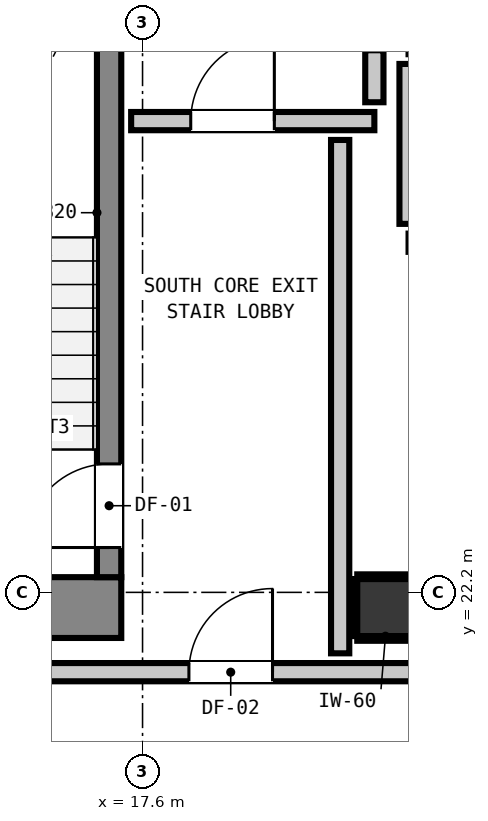
"""IFC4 building model, lengths in metres.
Left out: names, types, materials, properties, quantities, classifications, styles, units other than length and angle.
Written with IfcOpenShell. Run it as: python <this file> out.ifc"""

import sys

from ifc_helpers import new_model, si_unit, direction, frame, frame_2d, origin, origin_2d, place, context, subcontext, project, spatial, rectangle, extrude, element, fill, save


model = new_model("IFC4")
c1 = context("Model", 3, precision=1e-05, world=origin(), true_north=direction((0.0, 1.0)))
c2 = subcontext(c1, "Body", "Model", "MODEL_VIEW")
j1 = project(units=[si_unit("LENGTHUNIT", "METRE"), si_unit("PLANEANGLEUNIT", "RADIAN")], contexts=[c1])
p1 = place(None, origin())
s1 = spatial("IfcSite", under=j1, at=p1, CompositionType="ELEMENT")
p2 = place(p1, origin())
s2 = spatial("IfcBuilding", under=s1, at=p2, CompositionType="ELEMENT")
p3 = place(p2, frame((0.0, 0.0, 200.12)))
s3 = spatial("IfcBuildingStorey", under=s2, at=p3, CompositionType="ELEMENT", Elevation=200.12)
p4 = place(p3, frame((20.8, 22.0, 0.0), z_axis=(0.0, 0.0, 1.0), x_axis=(1.0, 0.0, 0.0)))
e1 = element("IfcColumn", 1, at=p4, inside=s3, PredefinedType="COLUMN", context=c2, shape_type="SweptSolid", body=[
    extrude(rectangle(XDim=0.75, YDim=0.75, at=origin_2d()), origin(), (0.0, 0.0, 1.0), 3.32),
])
p5 = place(p3, frame((13.24, 22.0, 0.0), z_axis=(0.0, 0.0, 1.0), x_axis=(1.0, 0.0, 0.0)))
e2 = element("IfcWall", 2, at=p5, inside=s3, PredefinedType="SHEAR", context=c2, shape_type="SweptSolid", body=[
    extrude(rectangle(XDim=4.08, YDim=0.8, at=frame_2d((2.04, 0.0))), origin(), (0.0, 0.0, 1.0), 3.32),
])
p6 = place(p3, frame((17.16, 22.4, 0.0), z_axis=(0.0, 0.0, 1.0), x_axis=(0.0, 1.0, 0.0)))
e3 = element("IfcWall", 3, at=p6, inside=s3, PredefinedType="SHEAR", context=c2, shape_type="SweptSolid", body=[
    extrude(rectangle(XDim=8.0, YDim=0.32, at=frame_2d((4.0, 0.0))), origin(), (0.0, 0.0, 1.0), 3.32),
])
p7 = place(p6, frame((0.39, 0.0, 0.0)))
e4 = element("IfcOpeningElement", 4, at=p7, cuts=e3, PredefinedType="OPENING", context=c2, shape_type="SweptSolid", body=[
    extrude(rectangle(XDim=1.1, YDim=2.15, at=frame_2d((0.55, 1.075))), frame((0.0, 0.17, 0.0), z_axis=(0.0, -1.0, 0.0), x_axis=(1.0, 0.0, 0.0)), (0.0, 0.0, 1.0), 0.34),
])
for number, where, z_axis, x_axis in (
    (5, (21.1, 26.8, 0.0), (0.0, 0.0, 1.0), (1.0, 0.0, 0.0)),
    (6, (21.1, 29.4, 0.0), (0.0, 0.0, 1.0), (1.0, 0.0, 0.0)),
):
    element("IfcWall", number, at=place(p3, frame(where, z_axis=z_axis, x_axis=x_axis)), inside=s3, PredefinedType="PARTITIONING", context=c2, shape_type="SweptSolid", body=[
        extrude(rectangle(XDim=2.2, YDim=0.24, at=frame_2d((1.1, 0.0))), origin(), (0.0, 0.0, 1.0), 3.1),
    ])
p8 = place(p3, frame((21.1, 27.048, 0.0), z_axis=(0.0, 0.0, 1.0), x_axis=(0.0, 1.0, 0.0)))
e7 = element("IfcWall", 7, at=p8, inside=s3, PredefinedType="PARTITIONING", context=c2, shape_type="SweptSolid", body=[
    extrude(rectangle(XDim=2.104, YDim=0.24, at=frame_2d((1.052, 0.0))), origin(), (0.0, 0.0, 1.0), 2.335),
])
p9 = place(p3, frame((4.587, 21.15, 0.0), z_axis=(0.0, 0.0, 1.0), x_axis=(1.0, 0.0, 0.0)))
e8 = element("IfcWall", 8, at=p9, inside=s3, PredefinedType="PARTITIONING", context=c2, shape_type="SweptSolid", body=[
    extrude(rectangle(XDim=36.626, YDim=0.24, at=frame_2d((18.313, 0.0))), origin(), (0.0, 0.0, 1.0), 3.1),
])
p10 = place(p9, frame((13.623, 0.0, 0.0)))
e9 = element("IfcOpeningElement", 9, at=p10, cuts=e8, PredefinedType="OPENING", context=c2, shape_type="SweptSolid", body=[
    extrude(rectangle(XDim=1.1, YDim=2.15, at=frame_2d((0.55, 1.075))), frame((0.0, 0.13, 0.0), z_axis=(0.0, -1.0, 0.0), x_axis=(1.0, 0.0, 0.0)), (0.0, 0.0, 1.0), 0.26),
])
p11 = place(p9, frame((4.723, 0.0, 0.0)))
e10 = element("IfcOpeningElement", 10, at=p11, cuts=e8, PredefinedType="OPENING", context=c2, shape_type="SweptSolid", body=[
    extrude(rectangle(XDim=1.0, YDim=2.15, at=frame_2d((0.5, 1.075))), frame((0.0, 0.13, 0.0), z_axis=(0.0, -1.0, 0.0), x_axis=(1.0, 0.0, 0.0)), (0.0, 0.0, 1.0), 0.26),
])
p12 = place(p3, frame((17.45, 28.4, 0.0), z_axis=(0.0, 0.0, 1.0), x_axis=(1.0, 0.0, 0.0)))
e11 = element("IfcWall", 11, at=p12, inside=s3, PredefinedType="PARTITIONING", context=c2, shape_type="SweptSolid", body=[
    extrude(rectangle(XDim=3.2, YDim=0.24, at=frame_2d((1.6, 0.0))), origin(), (0.0, 0.0, 1.0), 3.1),
])
p13 = place(p12, frame((0.784, 0.0, 0.0)))
e12 = element("IfcOpeningElement", 12, at=p13, cuts=e11, PredefinedType="OPENING", context=c2, shape_type="SweptSolid", body=[
    extrude(rectangle(XDim=1.1, YDim=2.15, at=frame_2d((0.55, 1.075))), frame((0.0, 0.13, 0.0), z_axis=(0.0, -1.0, 0.0), x_axis=(1.0, 0.0, 0.0)), (0.0, 0.0, 1.0), 0.26),
])
p14 = place(p3, frame((20.2, 21.398, 0.0), z_axis=(0.0, 0.0, 1.0), x_axis=(0.0, 1.0, 0.0)))
e13 = element("IfcWall", 13, at=p14, inside=s3, PredefinedType="PARTITIONING", context=c2, shape_type="SweptSolid", body=[
    extrude(rectangle(XDim=6.754, YDim=0.24, at=frame_2d((3.377, 0.0))), origin(), (0.0, 0.0, 1.0), 3.1),
])
p15 = place(p3, frame((20.65, 28.648, 0.0), z_axis=(0.0, 0.0, 1.0), x_axis=(0.0, 1.0, 0.0)))
e14 = element("IfcWall", 14, at=p15, inside=s3, PredefinedType="PARTITIONING", context=c2, shape_type="SweptSolid", body=[
    extrude(rectangle(XDim=0.684, YDim=0.24, at=frame_2d((0.342, 0.0))), origin(), (0.0, 0.0, 1.0), 2.335),
])
for number, where, z_axis, x_axis in (
    (15, (20.425, 21.593, 0.0), (0.0, 0.0, 1.0), (1.0, 0.0, 0.0)),
    (16, (20.425, 22.407, 0.0), (0.0, 0.0, 1.0), (1.0, 0.0, 0.0)),
):
    element("IfcWall", number, at=place(p3, frame(where, z_axis=z_axis, x_axis=x_axis)), inside=s3, PredefinedType="PARTITIONING", context=c2, shape_type="SweptSolid", body=[
        extrude(rectangle(XDim=0.742, YDim=0.06, at=frame_2d((0.371, 0.0))), origin(), (0.0, 0.0, 1.0), 1.45),
    ])
p16 = place(p3, frame((20.393, 21.625, 0.0), z_axis=(0.0, 0.0, 1.0), x_axis=(0.0, 1.0, 0.0)))
e17 = element("IfcWall", 17, at=p16, inside=s3, PredefinedType="PARTITIONING", context=c2, shape_type="SweptSolid", body=[
    extrude(rectangle(XDim=0.75, YDim=0.06, at=frame_2d((0.375, 0.0))), origin(), (0.0, 0.0, 1.0), 1.45),
])
p17 = place(p7, origin())
e18 = element("IfcDoor", 18, at=p17, inside=s3, OperationType="SINGLE_SWING_LEFT", PredefinedType="DOOR", context=c2, shape_type="SweptSolid", body=[
    extrude(rectangle(XDim=1.1, YDim=2.15, at=frame_2d((0.55, 1.075))), frame((0.0, 0.025, 0.0), z_axis=(0.0, -1.0, 0.0), x_axis=(1.0, 0.0, 0.0)), (0.0, 0.0, 1.0), 0.05),
])
fill(e4, e18)
p18 = place(p13, origin())
e19 = element("IfcDoor", 19, at=p18, inside=s3, OperationType="SINGLE_SWING_RIGHT", PredefinedType="DOOR", context=c2, shape_type="SweptSolid", body=[
    extrude(rectangle(XDim=1.1, YDim=2.15, at=frame_2d((0.55, 1.075))), frame((0.0, 0.025, 0.0), z_axis=(0.0, -1.0, 0.0), x_axis=(1.0, 0.0, 0.0)), (0.0, 0.0, 1.0), 0.05),
])
fill(e12, e19)
p19 = place(p10, origin())
e20 = element("IfcDoor", 20, at=p19, inside=s3, OperationType="SINGLE_SWING_RIGHT", PredefinedType="DOOR", context=c2, shape_type="SweptSolid", body=[
    extrude(rectangle(XDim=1.1, YDim=2.15, at=frame_2d((0.55, 1.075))), frame((0.0, 0.025, 0.0), z_axis=(0.0, -1.0, 0.0), x_axis=(1.0, 0.0, 0.0)), (0.0, 0.0, 1.0), 0.05),
])
fill(e9, e20)
save(model, sys.argv[1])
